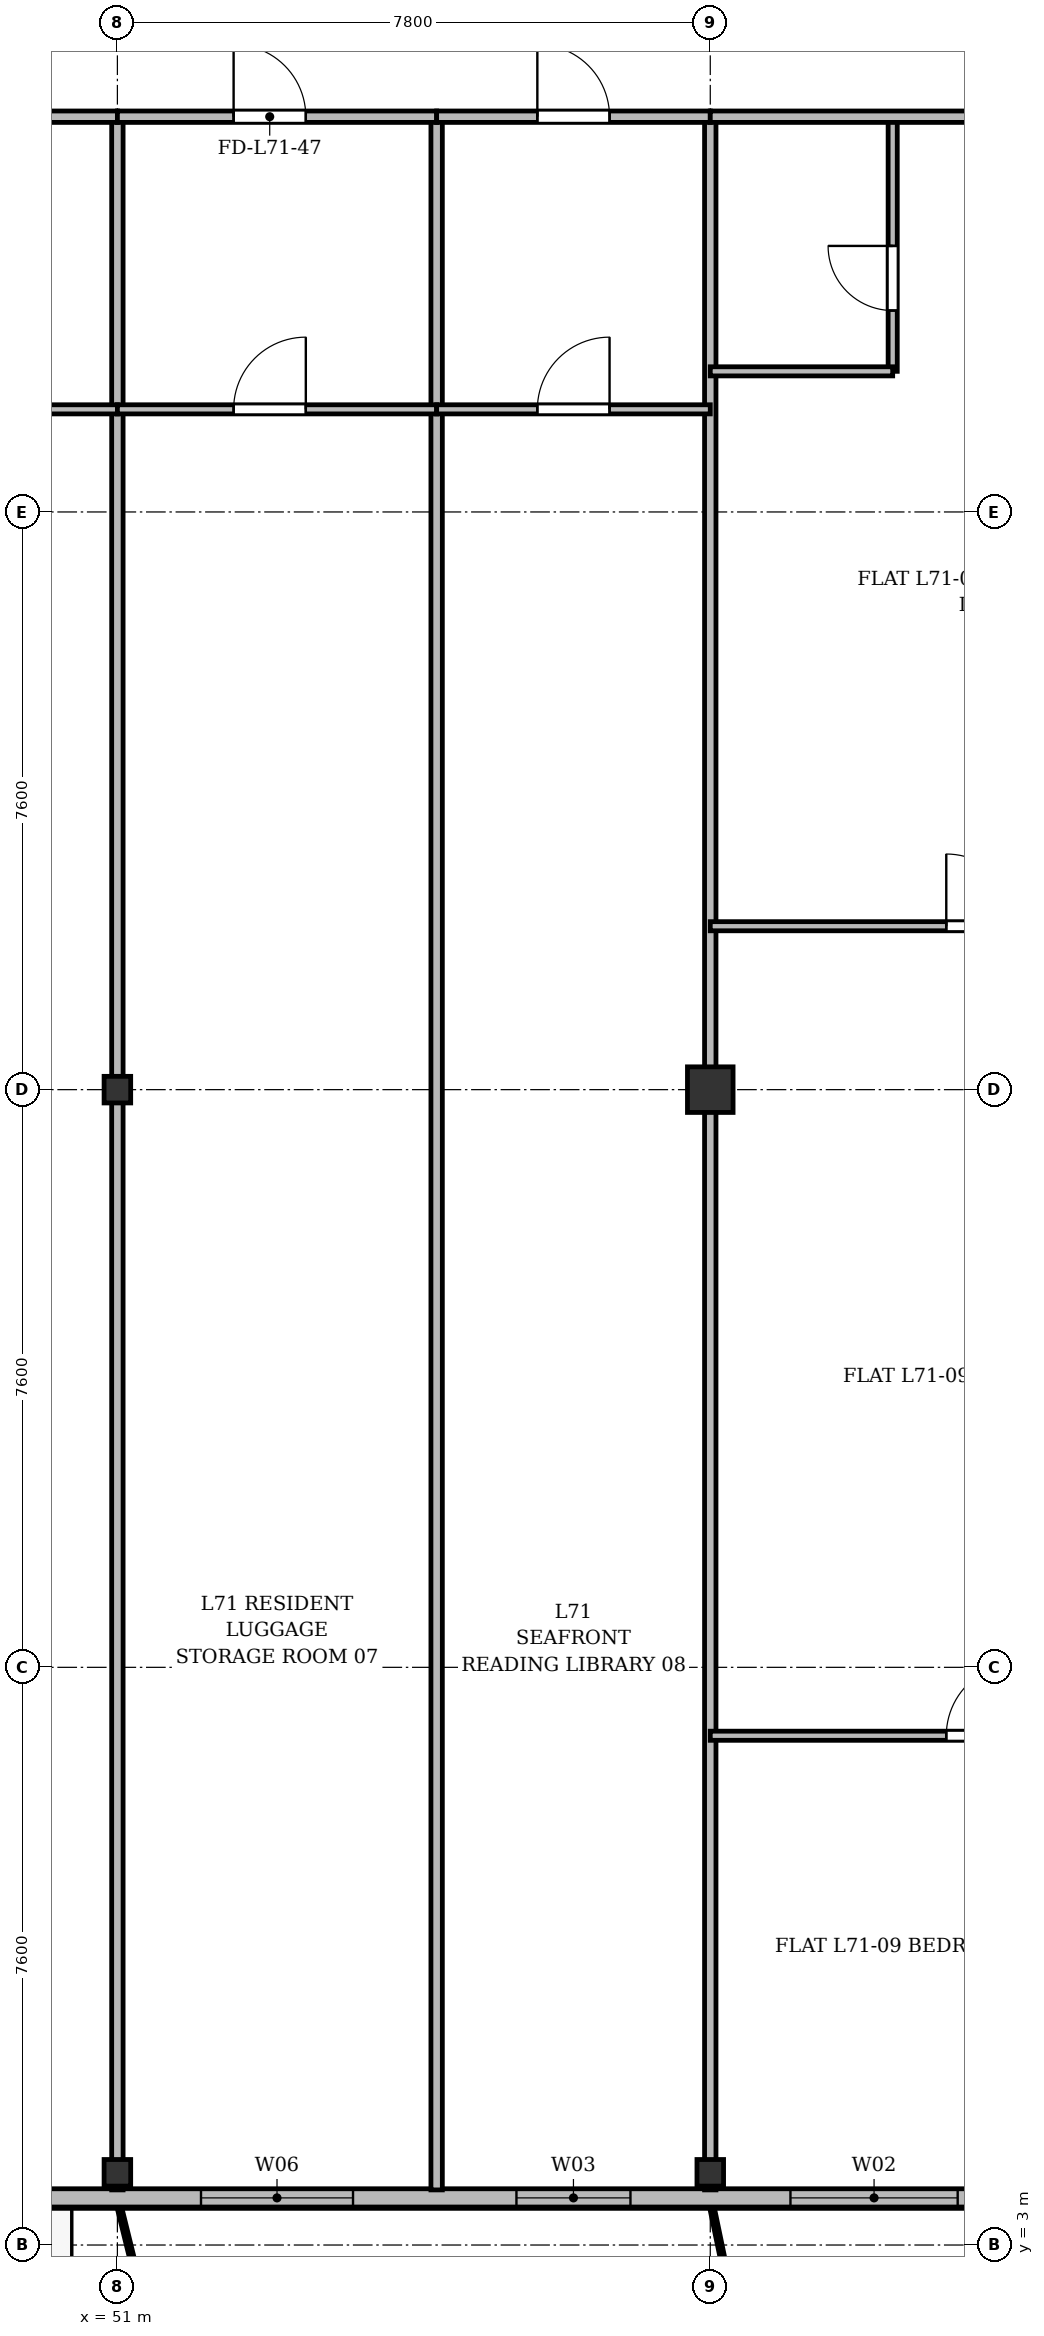
"""IFC4 building model, lengths in metres.
Left out: names, types, materials, properties, quantities, classifications, styles, units other than length and angle.
Written with IfcOpenShell. Run it as: python <this file> out.ifc"""

import sys

from ifc_helpers import new_model, si_unit, direction, frame, frame_2d, origin, origin_2d, place, context, subcontext, project, spatial, rectangle, i_section, extrude, source, transform, mapped, element, fill, save


model = new_model("IFC4")
c1 = context("Model", 3, precision=1e-05, world=origin(), true_north=direction((0.0, 1.0)))
c2 = subcontext(c1, "Body", "Model", "MODEL_VIEW")
j1 = project(units=[si_unit("LENGTHUNIT", "METRE"), si_unit("PLANEANGLEUNIT", "RADIAN")], contexts=[c1])
p1 = place(None, origin())
s1 = spatial("IfcSite", under=j1, at=p1, CompositionType="ELEMENT")
p2 = place(p1, origin())
s2 = spatial("IfcBuilding", under=s1, at=p2, CompositionType="ELEMENT")
p3 = place(p2, frame((0.0, 0.0, 273.9)))
s3 = spatial("IfcBuildingStorey", under=s2, at=p3, CompositionType="ELEMENT", Elevation=273.9)
m1 = source(origin(), c2, "Body", "SweptSolid", [
    extrude(i_section(OverallWidth=0.35, OverallDepth=0.35, WebThickness=0.018, FlangeThickness=0.028, at=origin_2d()), origin(), (0.0, 0.0, 1.0), 3.6),
])
for number, where, z_axis, x_axis in (
    (1, (51.0, 3.95, 0.0), (0.0, 0.0, 1.0), (1.0, 0.0, 0.0)),
    (2, (51.0, 18.2, 0.0), (0.0, 0.0, 1.0), (1.0, 0.0, 0.0)),
    (3, (58.8, 3.95, 0.0), (0.0, 0.0, 1.0), (1.0, 0.0, 0.0)),
):
    element("IfcColumn", number, at=place(p3, frame(where, z_axis=z_axis, x_axis=x_axis)), inside=s3, PredefinedType="COLUMN", context=c2, shape_type="MappedRepresentation", body=[
        mapped(m1, transform((0.0, 0.0, 0.0), x_axis=(1.0, 0.0, 0.0), y_axis=(0.0, 1.0, 0.0), z_axis=(0.0, 0.0, 1.0), scale=1.0)),
    ])
m2 = source(origin(), c2, "Body", "SweptSolid", [
    extrude(rectangle(XDim=0.6, YDim=0.6, at=origin_2d()), origin(), (0.0, 0.0, 1.0), 3.6),
])
p4 = place(p3, frame((58.8, 18.2, 0.0), z_axis=(0.0, 0.0, 1.0), x_axis=(1.0, 0.0, 0.0)))
e4 = element("IfcColumn", 4, at=p4, inside=s3, PredefinedType="COLUMN", context=c2, shape_type="MappedRepresentation", body=[
    mapped(m2, transform((0.0, 0.0, 0.0), x_axis=(1.0, 0.0, 0.0), y_axis=(0.0, 1.0, 0.0), z_axis=(0.0, 0.0, 1.0), scale=1.0)),
])
p5 = place(p3, frame((63.2, 3.62, 0.0), z_axis=(0.0, 0.0, 1.0), x_axis=(-1.0, 0.0, 0.0)))
e5 = element("IfcWall", 5, at=p5, inside=s3, PredefinedType="SOLIDWALL", context=c2, shape_type="SweptSolid", body=[
    extrude(rectangle(XDim=52.0, YDim=0.24, at=frame_2d((26.0, 0.0))), origin(), (0.0, 0.0, 1.0), 3.37),
])
p6 = place(p5, frame((1.145, 0.0, 0.9)))
e6 = element("IfcOpeningElement", 6, at=p6, cuts=e5, PredefinedType="OPENING", context=c2, shape_type="SweptSolid", body=[
    extrude(rectangle(XDim=2.2, YDim=1.8, at=frame_2d((1.1, 0.9))), frame((0.0, 0.13, 0.0), z_axis=(0.0, -1.0, 0.0), x_axis=(1.0, 0.0, 0.0)), (0.0, 0.0, 1.0), 0.26),
])
p7 = place(p5, frame((5.45, 0.0, 0.9)))
e7 = element("IfcOpeningElement", 7, at=p7, cuts=e5, PredefinedType="OPENING", context=c2, shape_type="SweptSolid", body=[
    extrude(rectangle(XDim=1.5, YDim=1.75, at=frame_2d((0.75, 0.875))), frame((0.0, 0.13, 0.0), z_axis=(0.0, -1.0, 0.0), x_axis=(1.0, 0.0, 0.0)), (0.0, 0.0, 1.0), 0.26),
])
p8 = place(p5, frame((9.1, 0.0, 0.9)))
e8 = element("IfcOpeningElement", 8, at=p8, cuts=e5, PredefinedType="OPENING", context=c2, shape_type="SweptSolid", body=[
    extrude(rectangle(XDim=2.0, YDim=1.95, at=frame_2d((1.0, 0.975))), frame((0.0, 0.13, 0.0), z_axis=(0.0, -1.0, 0.0), x_axis=(1.0, 0.0, 0.0)), (0.0, 0.0, 1.0), 0.26),
])
p9 = place(p5, frame((14.017, 0.0, 0.0)))
e9 = element("IfcOpeningElement", 9, at=p9, cuts=e5, PredefinedType="OPENING", context=c2, shape_type="SweptSolid", body=[
    extrude(rectangle(XDim=1.2, YDim=2.2, at=frame_2d((0.6, 1.1))), frame((0.0, 0.13, 0.0), z_axis=(0.0, -1.0, 0.0), x_axis=(1.0, 0.0, 0.0)), (0.0, 0.0, 1.0), 0.26),
])
p10 = place(p5, frame((25.1, 0.0, 0.9)))
e10 = element("IfcOpeningElement", 10, at=p10, cuts=e5, PredefinedType="OPENING", context=c2, shape_type="SweptSolid", body=[
    extrude(rectangle(XDim=1.8, YDim=1.8, at=frame_2d((0.9, 0.9))), frame((0.0, 0.13, 0.0), z_axis=(0.0, -1.0, 0.0), x_axis=(1.0, 0.0, 0.0)), (0.0, 0.0, 1.0), 0.26),
])
p11 = place(p5, frame((33.05, 0.0, 0.9)))
e11 = element("IfcOpeningElement", 11, at=p11, cuts=e5, PredefinedType="OPENING", context=c2, shape_type="SweptSolid", body=[
    extrude(rectangle(XDim=1.5, YDim=1.75, at=frame_2d((0.75, 0.875))), frame((0.0, 0.13, 0.0), z_axis=(0.0, -1.0, 0.0), x_axis=(1.0, 0.0, 0.0)), (0.0, 0.0, 1.0), 0.26),
])
p12 = place(p5, frame((35.45, 0.0, 0.9)))
e12 = element("IfcOpeningElement", 12, at=p12, cuts=e5, PredefinedType="OPENING", context=c2, shape_type="SweptSolid", body=[
    extrude(rectangle(XDim=1.5, YDim=1.75, at=frame_2d((0.75, 0.875))), frame((0.0, 0.13, 0.0), z_axis=(0.0, -1.0, 0.0), x_axis=(1.0, 0.0, 0.0)), (0.0, 0.0, 1.0), 0.26),
])
p13 = place(p5, frame((37.85, 0.0, 0.9)))
e13 = element("IfcOpeningElement", 13, at=p13, cuts=e5, PredefinedType="OPENING", context=c2, shape_type="SweptSolid", body=[
    extrude(rectangle(XDim=1.5, YDim=1.75, at=frame_2d((0.75, 0.875))), frame((0.0, 0.13, 0.0), z_axis=(0.0, -1.0, 0.0), x_axis=(1.0, 0.0, 0.0)), (0.0, 0.0, 1.0), 0.26),
])
p14 = place(p5, frame((41.452, 0.0, 0.0)))
e14 = element("IfcOpeningElement", 14, at=p14, cuts=e5, PredefinedType="OPENING", context=c2, shape_type="SweptSolid", body=[
    extrude(rectangle(XDim=1.2, YDim=2.2, at=frame_2d((0.6, 1.1))), frame((0.0, 0.13, 0.0), z_axis=(0.0, -1.0, 0.0), x_axis=(1.0, 0.0, 0.0)), (0.0, 0.0, 1.0), 0.26),
])
p15 = place(p5, frame((44.5, 0.0, 0.9)))
e15 = element("IfcOpeningElement", 15, at=p15, cuts=e5, PredefinedType="OPENING", context=c2, shape_type="SweptSolid", body=[
    extrude(rectangle(XDim=1.8, YDim=1.8, at=frame_2d((0.9, 0.9))), frame((0.0, 0.13, 0.0), z_axis=(0.0, -1.0, 0.0), x_axis=(1.0, 0.0, 0.0)), (0.0, 0.0, 1.0), 0.26),
])
p16 = place(p5, frame((48.655, 0.0, 0.9)))
e16 = element("IfcOpeningElement", 16, at=p16, cuts=e5, PredefinedType="OPENING", context=c2, shape_type="SweptSolid", body=[
    extrude(rectangle(XDim=2.2, YDim=1.8, at=frame_2d((1.1, 0.9))), frame((0.0, 0.13, 0.0), z_axis=(0.0, -1.0, 0.0), x_axis=(1.0, 0.0, 0.0)), (0.0, 0.0, 1.0), 0.26),
])
p17 = place(p3, frame((51.0, 3.725, 0.0), z_axis=(0.0, 0.0, 1.0), x_axis=(0.0, 1.0, 0.0)))
e17 = element("IfcWall", 17, at=p17, inside=s3, PredefinedType="PARTITIONING", context=c2, shape_type="SweptSolid", body=[
    extrude(rectangle(XDim=27.275, YDim=0.15, at=frame_2d((13.637, 0.0))), origin(), (0.0, 0.0, 1.0), 2.87),
])
p18 = place(p3, frame((55.2, 3.725, 0.0), z_axis=(0.0, 0.0, 1.0), x_axis=(0.0, 1.0, 0.0)))
e18 = element("IfcWall", 18, at=p18, inside=s3, PredefinedType="PARTITIONING", context=c2, shape_type="SweptSolid", body=[
    extrude(rectangle(XDim=27.275, YDim=0.15, at=frame_2d((13.637, 0.0))), origin(), (0.0, 0.0, 1.0), 2.92),
])
p19 = place(p3, frame((58.8, 3.725, 0.0), z_axis=(0.0, 0.0, 1.0), x_axis=(0.0, 1.0, 0.0)))
e19 = element("IfcWall", 19, at=p19, inside=s3, PredefinedType="PARTITIONING", context=c2, shape_type="SweptSolid", body=[
    extrude(rectangle(XDim=27.275, YDim=0.15, at=frame_2d((13.637, 0.0))), origin(), (0.0, 0.0, 1.0), 2.87),
])
p20 = place(p3, frame((43.8, 31.0, 0.0), z_axis=(0.0, 0.0, 1.0), x_axis=(1.0, 0.0, 0.0)))
e20 = element("IfcWall", 20, at=p20, inside=s3, PredefinedType="PARTITIONING", context=c2, shape_type="SweptSolid", body=[
    extrude(rectangle(XDim=7.2, YDim=0.15, at=frame_2d((3.6, 0.0))), origin(), (0.0, 0.0, 1.0), 2.87),
])
p21 = place(p20, frame((3.125, 0.0, 0.0)))
e21 = element("IfcOpeningElement", 21, at=p21, cuts=e20, PredefinedType="OPENING", context=c2, shape_type="SweptSolid", body=[
    extrude(rectangle(XDim=0.95, YDim=2.15, at=frame_2d((0.475, 1.075))), frame((0.0, 0.085, 0.0), z_axis=(0.0, -1.0, 0.0), x_axis=(1.0, 0.0, 0.0)), (0.0, 0.0, 1.0), 0.17),
])
p22 = place(p3, frame((43.8, 27.15, 0.0), z_axis=(0.0, 0.0, 1.0), x_axis=(1.0, 0.0, 0.0)))
e22 = element("IfcWall", 22, at=p22, inside=s3, PredefinedType="PARTITIONING", context=c2, shape_type="SweptSolid", body=[
    extrude(rectangle(XDim=7.2, YDim=0.12, at=frame_2d((3.6, 0.0))), origin(), (0.0, 0.0, 1.0), 2.87),
])
p23 = place(p22, frame((3.125, 0.0, 0.0)))
e23 = element("IfcOpeningElement", 23, at=p23, cuts=e22, PredefinedType="OPENING", context=c2, shape_type="SweptSolid", body=[
    extrude(rectangle(XDim=0.95, YDim=2.15, at=frame_2d((0.475, 1.075))), frame((0.0, 0.07, 0.0), z_axis=(0.0, -1.0, 0.0), x_axis=(1.0, 0.0, 0.0)), (0.0, 0.0, 1.0), 0.14),
])
p24 = place(p3, frame((51.0, 31.0, 0.0), z_axis=(0.0, 0.0, 1.0), x_axis=(1.0, 0.0, 0.0)))
e24 = element("IfcWall", 24, at=p24, inside=s3, PredefinedType="PARTITIONING", context=c2, shape_type="SweptSolid", body=[
    extrude(rectangle(XDim=4.2, YDim=0.15, at=frame_2d((2.1, 0.0))), origin(), (0.0, 0.0, 1.0), 2.87),
])
p25 = place(p24, frame((1.529, 0.0, 0.0)))
e25 = element("IfcOpeningElement", 25, at=p25, cuts=e24, PredefinedType="OPENING", context=c2, shape_type="SweptSolid", body=[
    extrude(rectangle(XDim=0.95, YDim=2.15, at=frame_2d((0.475, 1.075))), frame((0.0, 0.085, 0.0), z_axis=(0.0, -1.0, 0.0), x_axis=(1.0, 0.0, 0.0)), (0.0, 0.0, 1.0), 0.17),
])
p26 = place(p3, frame((51.0, 27.15, 0.0), z_axis=(0.0, 0.0, 1.0), x_axis=(1.0, 0.0, 0.0)))
e26 = element("IfcWall", 26, at=p26, inside=s3, PredefinedType="PARTITIONING", context=c2, shape_type="SweptSolid", body=[
    extrude(rectangle(XDim=4.2, YDim=0.12, at=frame_2d((2.1, 0.0))), origin(), (0.0, 0.0, 1.0), 2.87),
])
p27 = place(p26, frame((1.529, 0.0, 0.0)))
e27 = element("IfcOpeningElement", 27, at=p27, cuts=e26, PredefinedType="OPENING", context=c2, shape_type="SweptSolid", body=[
    extrude(rectangle(XDim=0.95, YDim=2.15, at=frame_2d((0.475, 1.075))), frame((0.0, 0.07, 0.0), z_axis=(0.0, -1.0, 0.0), x_axis=(1.0, 0.0, 0.0)), (0.0, 0.0, 1.0), 0.14),
])
p28 = place(p3, frame((55.2, 31.0, 0.0), z_axis=(0.0, 0.0, 1.0), x_axis=(1.0, 0.0, 0.0)))
e28 = element("IfcWall", 28, at=p28, inside=s3, PredefinedType="PARTITIONING", context=c2, shape_type="SweptSolid", body=[
    extrude(rectangle(XDim=3.6, YDim=0.15, at=frame_2d((1.8, 0.0))), origin(), (0.0, 0.0, 1.0), 2.87),
])
p29 = place(p28, frame((1.325, 0.0, 0.0)))
e29 = element("IfcOpeningElement", 29, at=p29, cuts=e28, PredefinedType="OPENING", context=c2, shape_type="SweptSolid", body=[
    extrude(rectangle(XDim=0.95, YDim=2.15, at=frame_2d((0.475, 1.075))), frame((0.0, 0.085, 0.0), z_axis=(0.0, -1.0, 0.0), x_axis=(1.0, 0.0, 0.0)), (0.0, 0.0, 1.0), 0.17),
])
p30 = place(p3, frame((55.2, 27.15, 0.0), z_axis=(0.0, 0.0, 1.0), x_axis=(1.0, 0.0, 0.0)))
e30 = element("IfcWall", 30, at=p30, inside=s3, PredefinedType="PARTITIONING", context=c2, shape_type="SweptSolid", body=[
    extrude(rectangle(XDim=3.6, YDim=0.12, at=frame_2d((1.8, 0.0))), origin(), (0.0, 0.0, 1.0), 2.87),
])
p31 = place(p30, frame((1.325, 0.0, 0.0)))
e31 = element("IfcOpeningElement", 31, at=p31, cuts=e30, PredefinedType="OPENING", context=c2, shape_type="SweptSolid", body=[
    extrude(rectangle(XDim=0.95, YDim=2.15, at=frame_2d((0.475, 1.075))), frame((0.0, 0.07, 0.0), z_axis=(0.0, -1.0, 0.0), x_axis=(1.0, 0.0, 0.0)), (0.0, 0.0, 1.0), 0.14),
])
p32 = place(p3, frame((58.8, 20.35, 0.0), z_axis=(0.0, 0.0, 1.0), x_axis=(1.0, 0.0, 0.0)))
e32 = element("IfcWall", 32, at=p32, inside=s3, PredefinedType="PARTITIONING", context=c2, shape_type="SweptSolid", body=[
    extrude(rectangle(XDim=7.16, YDim=0.12, at=frame_2d((3.58, 0.0))), origin(), (0.0, 0.0, 1.0), 2.87),
])
p33 = place(p32, frame((3.105, 0.0, 0.0)))
e33 = element("IfcOpeningElement", 33, at=p33, cuts=e32, PredefinedType="OPENING", context=c2, shape_type="SweptSolid", body=[
    extrude(rectangle(XDim=0.95, YDim=2.15, at=frame_2d((0.475, 1.075))), frame((0.0, 0.07, 0.0), z_axis=(0.0, -1.0, 0.0), x_axis=(1.0, 0.0, 0.0)), (0.0, 0.0, 1.0), 0.14),
])
p34 = place(p3, frame((61.2, 27.65, 0.0), z_axis=(0.0, 0.0, 1.0), x_axis=(0.0, 1.0, 0.0)))
e34 = element("IfcWall", 34, at=p34, inside=s3, PredefinedType="PARTITIONING", context=c2, shape_type="SweptSolid", body=[
    extrude(rectangle(XDim=3.35, YDim=0.12, at=frame_2d((1.675, 0.0))), origin(), (0.0, 0.0, 1.0), 3.37),
])
p35 = place(p34, frame((0.8, 0.0, 0.0)))
e35 = element("IfcOpeningElement", 35, at=p35, cuts=e34, PredefinedType="OPENING", context=c2, shape_type="SweptSolid", body=[
    extrude(rectangle(XDim=0.85, YDim=2.1, at=frame_2d((0.425, 1.05))), frame((0.0, 0.07, 0.0), z_axis=(0.0, -1.0, 0.0), x_axis=(1.0, 0.0, 0.0)), (0.0, 0.0, 1.0), 0.14),
])
p36 = place(p3, frame((58.8, 27.65, 0.0), z_axis=(0.0, 0.0, 1.0), x_axis=(1.0, 0.0, 0.0)))
e36 = element("IfcWall", 36, at=p36, inside=s3, PredefinedType="PARTITIONING", context=c2, shape_type="SweptSolid", body=[
    extrude(rectangle(XDim=2.4, YDim=0.12, at=frame_2d((1.2, 0.0))), origin(), (0.0, 0.0, 1.0), 2.87),
])
p37 = place(p3, frame((58.8, 31.0, 0.0), z_axis=(0.0, 0.0, 1.0), x_axis=(1.0, 0.0, 0.0)))
e37 = element("IfcWall", 37, at=p37, inside=s3, PredefinedType="PARTITIONING", context=c2, shape_type="SweptSolid", body=[
    extrude(rectangle(XDim=7.175, YDim=0.15, at=frame_2d((3.587, 0.0))), origin(), (0.0, 0.0, 1.0), 2.87),
])
p38 = place(p37, frame((4.681, 0.0, 0.0)))
e38 = element("IfcOpeningElement", 38, at=p38, cuts=e37, PredefinedType="OPENING", context=c2, shape_type="SweptSolid", body=[
    extrude(rectangle(XDim=0.95, YDim=2.15, at=frame_2d((0.475, 1.075))), frame((0.0, 0.085, 0.0), z_axis=(0.0, -1.0, 0.0), x_axis=(1.0, 0.0, 0.0)), (0.0, 0.0, 1.0), 0.17),
])
p39 = place(p3, frame((58.8, 9.7, 0.0), z_axis=(0.0, 0.0, 1.0), x_axis=(1.0, 0.0, 0.0)))
e39 = element("IfcWall", 39, at=p39, inside=s3, PredefinedType="PARTITIONING", context=c2, shape_type="SweptSolid", body=[
    extrude(rectangle(XDim=7.16, YDim=0.12, at=frame_2d((3.58, 0.0))), origin(), (0.0, 0.0, 1.0), 2.87),
])
p40 = place(p39, frame((3.105, 0.0, 0.0)))
e40 = element("IfcOpeningElement", 40, at=p40, cuts=e39, PredefinedType="OPENING", context=c2, shape_type="SweptSolid", body=[
    extrude(rectangle(XDim=0.95, YDim=2.15, at=frame_2d((0.475, 1.075))), frame((0.0, 0.07, 0.0), z_axis=(0.0, -1.0, 0.0), x_axis=(1.0, 0.0, 0.0)), (0.0, 0.0, 1.0), 0.14),
])
m3 = source(origin(), c2, "Body", "SweptSolid", [
    extrude(rectangle(XDim=2.2, YDim=1.8, at=frame_2d((1.1, 0.9))), frame((0.0, 0.03, 0.0), z_axis=(0.0, -1.0, 0.0), x_axis=(1.0, 0.0, 0.0)), (0.0, 0.0, 1.0), 0.06),
])
p41 = place(p6, origin())
e41 = element("IfcWindow", 41, at=p41, inside=s3, PartitioningType="SINGLE_PANEL", PredefinedType="WINDOW", context=c2, shape_type="MappedRepresentation", body=[
    mapped(m3, transform((0.0, 0.0, 0.0), x_axis=(1.0, 0.0, 0.0), y_axis=(0.0, 1.0, 0.0), z_axis=(0.0, 0.0, 1.0), scale=1.0)),
])
fill(e6, e41)
m4 = source(origin(), c2, "Body", "SweptSolid", [
    extrude(rectangle(XDim=1.5, YDim=1.75, at=frame_2d((0.75, 0.875))), frame((0.0, 0.03, 0.0), z_axis=(0.0, -1.0, 0.0), x_axis=(1.0, 0.0, 0.0)), (0.0, 0.0, 1.0), 0.06),
])
p42 = place(p7, origin())
e42 = element("IfcWindow", 42, at=p42, inside=s3, PartitioningType="SINGLE_PANEL", PredefinedType="WINDOW", context=c2, shape_type="MappedRepresentation", body=[
    mapped(m4, transform((0.0, 0.0, 0.0), x_axis=(1.0, 0.0, 0.0), y_axis=(0.0, 1.0, 0.0), z_axis=(0.0, 0.0, 1.0), scale=1.0)),
])
fill(e7, e42)
m5 = source(origin(), c2, "Body", "SweptSolid", [
    extrude(rectangle(XDim=2.0, YDim=1.95, at=frame_2d((1.0, 0.975))), frame((0.0, 0.03, 0.0), z_axis=(0.0, -1.0, 0.0), x_axis=(1.0, 0.0, 0.0)), (0.0, 0.0, 1.0), 0.06),
])
p43 = place(p8, origin())
e43 = element("IfcWindow", 43, at=p43, inside=s3, PartitioningType="SINGLE_PANEL", PredefinedType="WINDOW", context=c2, shape_type="MappedRepresentation", body=[
    mapped(m5, transform((0.0, 0.0, 0.0), x_axis=(1.0, 0.0, 0.0), y_axis=(0.0, 1.0, 0.0), z_axis=(0.0, 0.0, 1.0), scale=1.0)),
])
fill(e8, e43)
m6 = source(origin(), c2, "Body", "SweptSolid", [
    extrude(rectangle(XDim=0.95, YDim=2.15, at=frame_2d((0.475, 1.075))), frame((0.0, 0.025, 0.0), z_axis=(0.0, -1.0, 0.0), x_axis=(1.0, 0.0, 0.0)), (0.0, 0.0, 1.0), 0.05),
])
p44 = place(p25, origin())
e44 = element("IfcDoor", 44, at=p44, inside=s3, OperationType="SINGLE_SWING_LEFT", PredefinedType="DOOR", context=c2, shape_type="MappedRepresentation", body=[
    mapped(m6, transform((0.0, 0.0, 0.0), x_axis=(1.0, 0.0, 0.0), y_axis=(0.0, 1.0, 0.0), z_axis=(0.0, 0.0, 1.0), scale=1.0)),
])
fill(e25, e44)
p45 = place(p27, origin())
e45 = element("IfcDoor", 45, at=p45, inside=s3, OperationType="SINGLE_SWING_RIGHT", PredefinedType="DOOR", context=c2, shape_type="MappedRepresentation", body=[
    mapped(m6, transform((0.0, 0.0, 0.0), x_axis=(1.0, 0.0, 0.0), y_axis=(0.0, 1.0, 0.0), z_axis=(0.0, 0.0, 1.0), scale=1.0)),
])
fill(e27, e45)
p46 = place(p29, origin())
e46 = element("IfcDoor", 46, at=p46, inside=s3, OperationType="SINGLE_SWING_LEFT", PredefinedType="DOOR", context=c2, shape_type="MappedRepresentation", body=[
    mapped(m6, transform((0.0, 0.0, 0.0), x_axis=(1.0, 0.0, 0.0), y_axis=(0.0, 1.0, 0.0), z_axis=(0.0, 0.0, 1.0), scale=1.0)),
])
fill(e29, e46)
p47 = place(p31, origin())
e47 = element("IfcDoor", 47, at=p47, inside=s3, OperationType="SINGLE_SWING_RIGHT", PredefinedType="DOOR", context=c2, shape_type="MappedRepresentation", body=[
    mapped(m6, transform((0.0, 0.0, 0.0), x_axis=(1.0, 0.0, 0.0), y_axis=(0.0, 1.0, 0.0), z_axis=(0.0, 0.0, 1.0), scale=1.0)),
])
fill(e31, e47)
p48 = place(p33, origin())
e48 = element("IfcDoor", 48, at=p48, inside=s3, OperationType="SINGLE_SWING_LEFT", PredefinedType="DOOR", context=c2, shape_type="MappedRepresentation", body=[
    mapped(m6, transform((0.0, 0.0, 0.0), x_axis=(1.0, 0.0, 0.0), y_axis=(0.0, 1.0, 0.0), z_axis=(0.0, 0.0, 1.0), scale=1.0)),
])
fill(e33, e48)
m7 = source(origin(), c2, "Body", "SweptSolid", [
    extrude(rectangle(XDim=0.85, YDim=2.1, at=frame_2d((0.425, 1.05))), frame((0.0, 0.025, 0.0), z_axis=(0.0, -1.0, 0.0), x_axis=(1.0, 0.0, 0.0)), (0.0, 0.0, 1.0), 0.05),
])
p49 = place(p35, origin())
e49 = element("IfcDoor", 49, at=p49, inside=s3, OperationType="SINGLE_SWING_RIGHT", PredefinedType="DOOR", context=c2, shape_type="MappedRepresentation", body=[
    mapped(m7, transform((0.0, 0.0, 0.0), x_axis=(1.0, 0.0, 0.0), y_axis=(0.0, 1.0, 0.0), z_axis=(0.0, 0.0, 1.0), scale=1.0)),
])
fill(e35, e49)
p50 = place(p40, origin())
e50 = element("IfcDoor", 50, at=p50, inside=s3, OperationType="SINGLE_SWING_RIGHT", PredefinedType="DOOR", context=c2, shape_type="MappedRepresentation", body=[
    mapped(m6, transform((0.0, 0.0, 0.0), x_axis=(1.0, 0.0, 0.0), y_axis=(0.0, 1.0, 0.0), z_axis=(0.0, 0.0, 1.0), scale=1.0)),
])
fill(e40, e50)
save(model, sys.argv[1])
